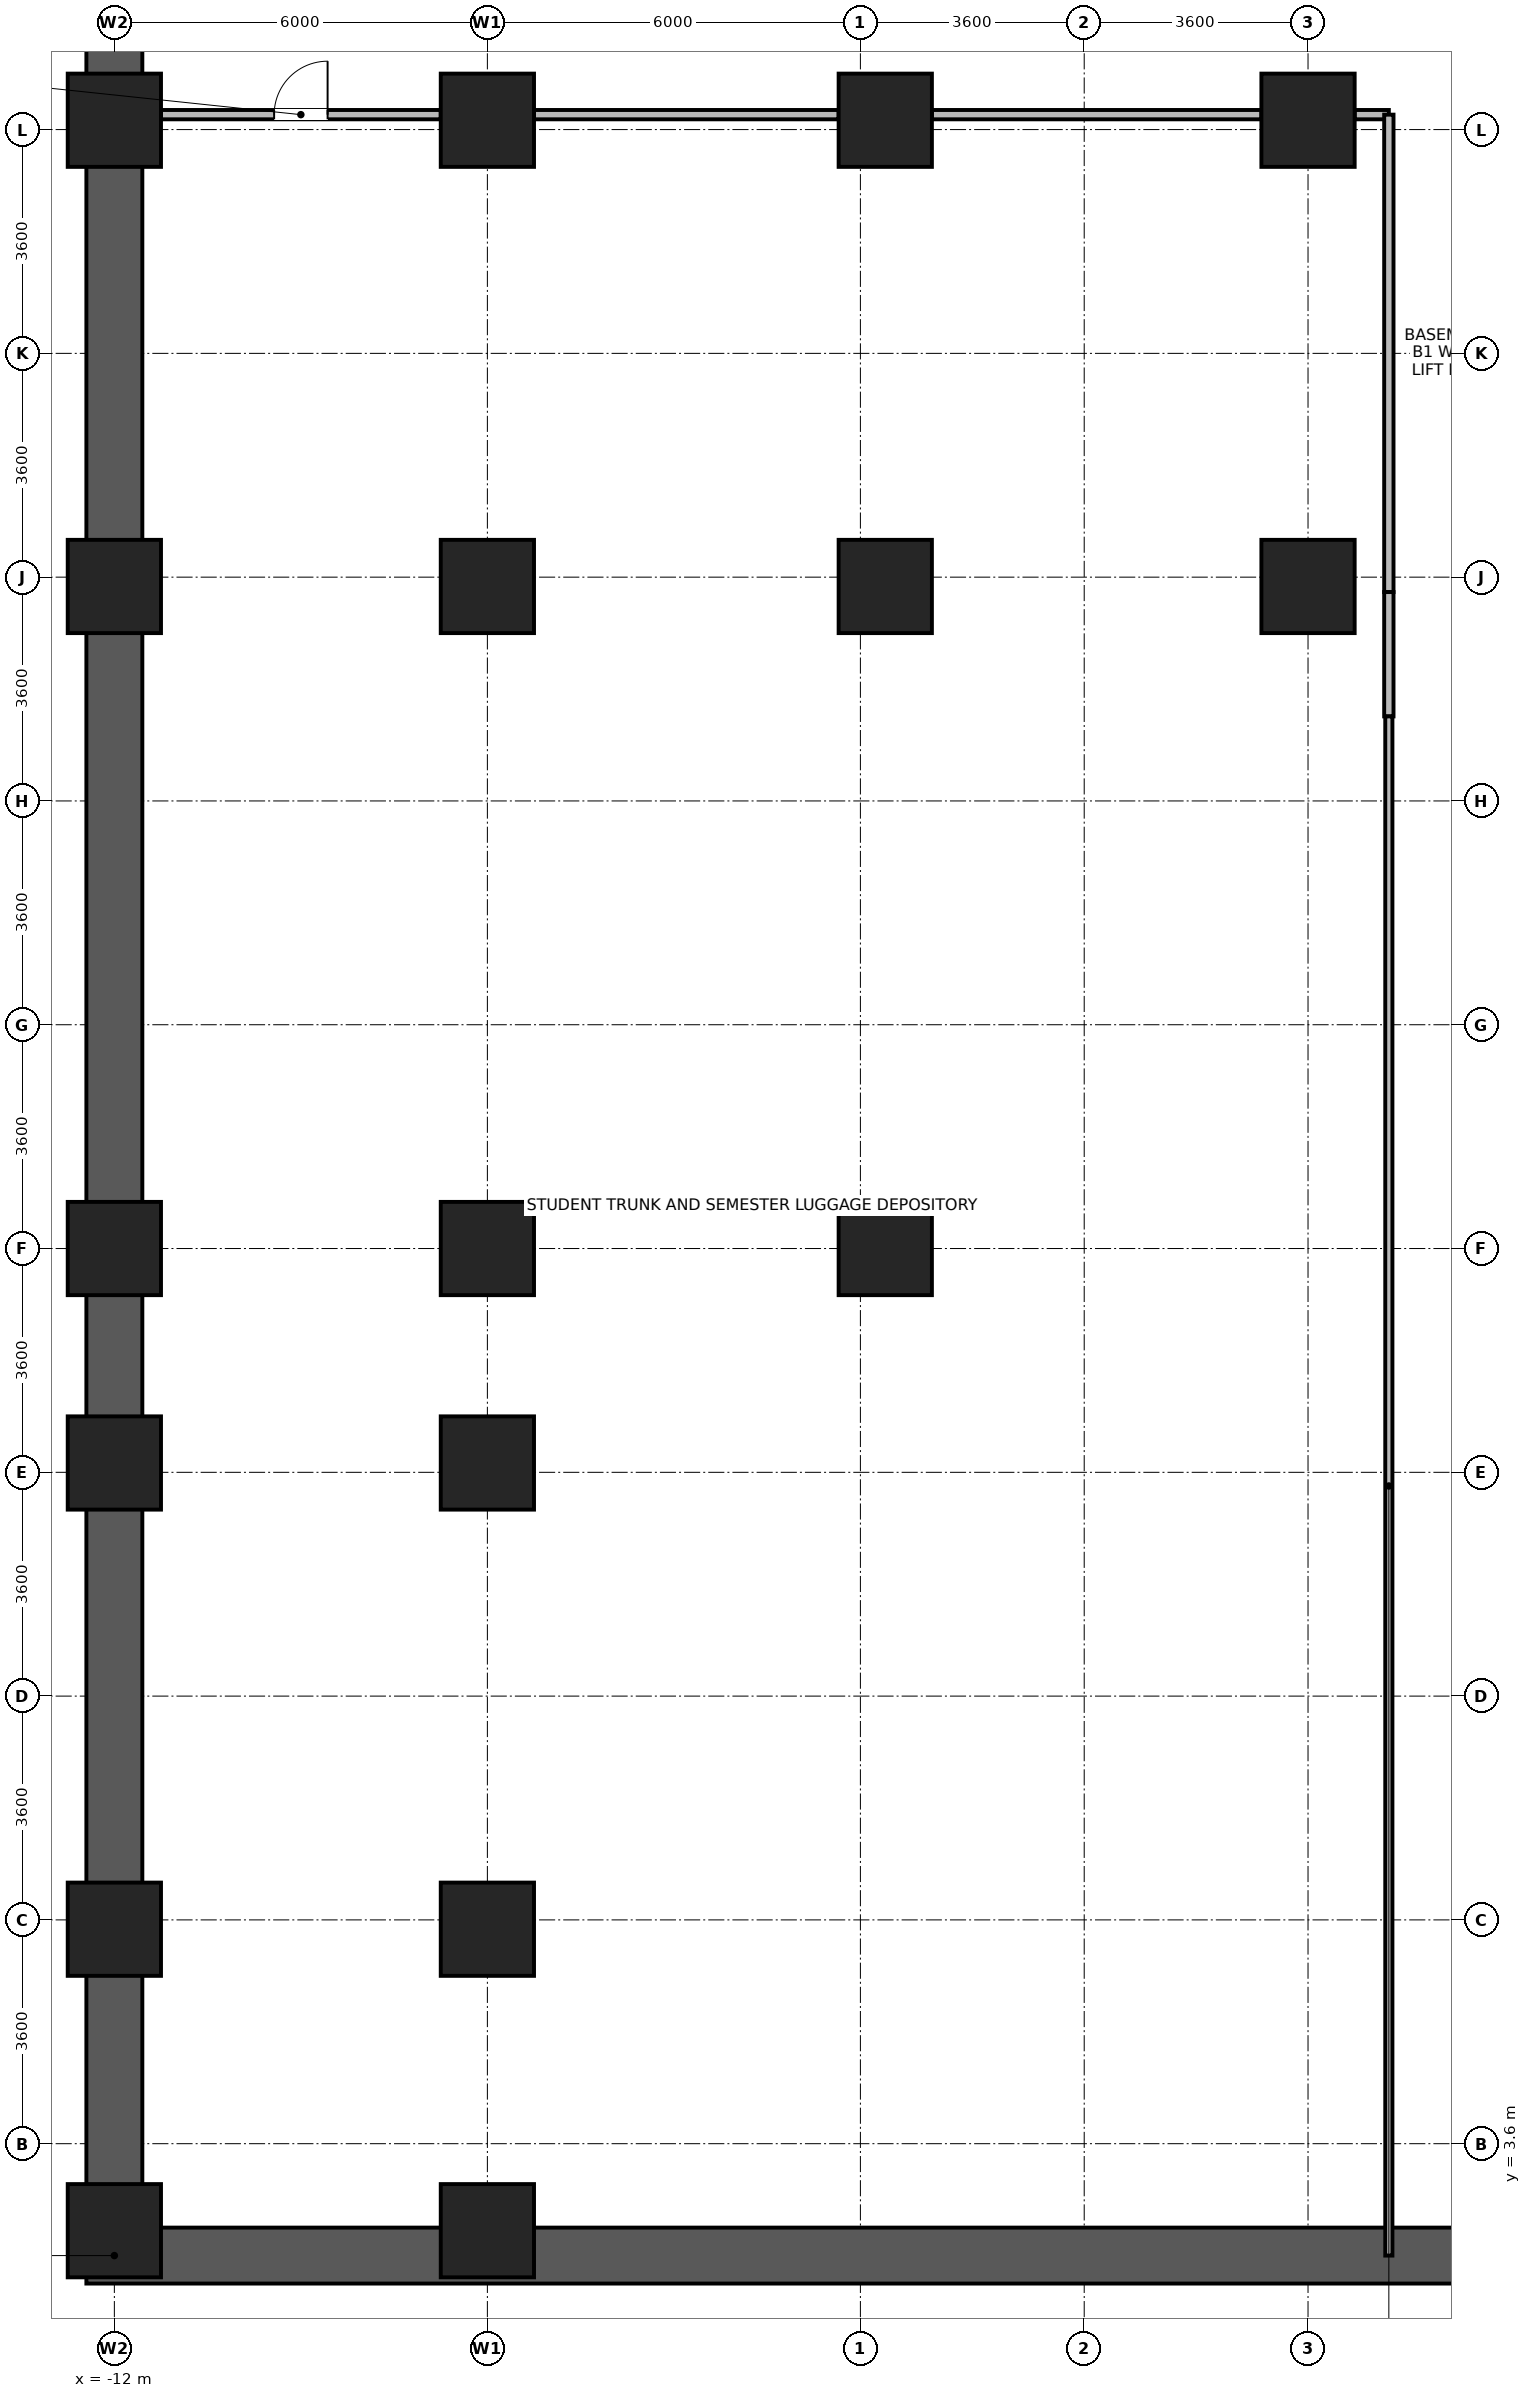
"""IFC4 building model, lengths in metres.
Left out: names, types, materials, properties, quantities, classifications, styles, units other than length and angle.
Written with IfcOpenShell. Run it as: python <this file> out.ifc"""

import sys

from ifc_helpers import new_model, si_unit, direction, frame, frame_2d, origin, origin_2d, place, context, subcontext, project, spatial, rectangle, extrude, source, transform, mapped, element, fill, save


model = new_model("IFC4")
c1 = context("Model", 3, precision=1e-05, world=origin(), true_north=direction((0.0, 1.0)))
c2 = subcontext(c1, "Body", "Model", "MODEL_VIEW")
j1 = project(units=[si_unit("LENGTHUNIT", "METRE"), si_unit("PLANEANGLEUNIT", "RADIAN")], contexts=[c1])
p1 = place(None, origin())
s1 = spatial("IfcSite", under=j1, at=p1, CompositionType="ELEMENT")
p2 = place(p1, origin())
s2 = spatial("IfcBuilding", under=s1, at=p2, CompositionType="ELEMENT")
p3 = place(p2, frame((0.0, 0.0, -4.5)))
s3 = spatial("IfcBuildingStorey", under=s2, at=p3, CompositionType="ELEMENT", Elevation=-4.5)
p4 = place(p3, frame((-12.45, 1.8, 0.0), z_axis=(0.0, 0.0, 1.0), x_axis=(1.0, 0.0, 0.0)))
e1 = element("IfcWall", 1, at=p4, inside=s3, PredefinedType="USERDEFINED", context=c2, shape_type="SweptSolid", body=[
    extrude(rectangle(XDim=86.1, YDim=0.9, at=frame_2d((43.05, 0.0))), origin(), (0.0, 0.0, 1.0), 4.15),
])
p5 = place(p3, frame((-12.0, 2.25, 0.0), z_axis=(0.0, 0.0, 1.0), x_axis=(0.0, 1.0, 0.0)))
e2 = element("IfcWall", 2, at=p5, inside=s3, PredefinedType="USERDEFINED", context=c2, shape_type="SweptSolid", body=[
    extrude(rectangle(XDim=42.15, YDim=0.9, at=frame_2d((21.075, 0.0))), origin(), (0.0, 0.0, 1.0), 4.15),
])
m1 = source(origin(), c2, "Body", "SweptSolid", [
    extrude(rectangle(XDim=1.5, YDim=1.5, at=origin_2d()), origin(), (0.0, 0.0, 1.0), 4.5),
])
for number, where, z_axis, x_axis in (
    (3, (7.2, 28.65, 0.0), (0.0, 0.0, 1.0), (1.0, 0.0, 0.0)),
    (4, (7.2, 36.15, 0.0), (0.0, 0.0, 1.0), (1.0, 0.0, 0.0)),
    (5, (0.4, 18.0, 0.0), (0.0, 0.0, 1.0), (1.0, 0.0, 0.0)),
    (6, (0.4, 28.65, 0.0), (0.0, 0.0, 1.0), (1.0, 0.0, 0.0)),
    (7, (0.4, 36.15, 0.0), (0.0, 0.0, 1.0), (1.0, 0.0, 0.0)),
    (8, (-12.0, 18.0, 0.0), (0.0, 0.0, 1.0), (1.0, 0.0, 0.0)),
    (9, (-12.0, 28.65, 0.0), (0.0, 0.0, 1.0), (1.0, 0.0, 0.0)),
    (10, (-12.0, 36.15, 0.0), (0.0, 0.0, 1.0), (1.0, 0.0, 0.0)),
    (11, (-6.0, 18.0, 0.0), (0.0, 0.0, 1.0), (1.0, 0.0, 0.0)),
    (12, (-6.0, 28.65, 0.0), (0.0, 0.0, 1.0), (1.0, 0.0, 0.0)),
    (13, (-6.0, 36.15, 0.0), (0.0, 0.0, 1.0), (1.0, 0.0, 0.0)),
    (14, (-12.0, 2.2, 0.0), (0.0, 0.0, 1.0), (1.0, 0.0, 0.0)),
    (15, (-6.0, 2.2, 0.0), (0.0, 0.0, 1.0), (1.0, 0.0, 0.0)),
    (16, (-12.0, 7.05, 0.0), (0.0, 0.0, 1.0), (1.0, 0.0, 0.0)),
    (17, (-6.0, 7.05, 0.0), (0.0, 0.0, 1.0), (1.0, 0.0, 0.0)),
    (18, (-12.0, 14.55, 0.0), (0.0, 0.0, 1.0), (1.0, 0.0, 0.0)),
    (19, (-6.0, 14.55, 0.0), (0.0, 0.0, 1.0), (1.0, 0.0, 0.0)),
):
    element("IfcColumn", number, at=place(p3, frame(where, z_axis=z_axis, x_axis=x_axis)), inside=s3, PredefinedType="COLUMN", context=c2, shape_type="MappedRepresentation", body=[
        mapped(m1, transform((0.0, 0.0, 0.0), x_axis=(1.0, 0.0, 0.0), y_axis=(0.0, 1.0, 0.0), z_axis=(0.0, 0.0, 1.0), scale=1.0)),
    ])
p6 = place(p3, frame((-11.25, 36.24, 0.0), z_axis=(0.0, 0.0, 1.0), x_axis=(1.0, 0.0, 0.0)))
e20 = element("IfcWall", 20, at=p6, inside=s3, PredefinedType="PARTITIONING", context=c2, shape_type="SweptSolid", body=[
    extrude(rectangle(XDim=4.5, YDim=0.15, at=frame_2d((2.25, 0.0))), origin(), (0.0, 0.0, 1.0), 3.43),
])
p7 = place(p6, frame((1.82, 0.0, 0.0)))
e21 = element("IfcOpeningElement", 21, at=p7, cuts=e20, PredefinedType="OPENING", context=c2, shape_type="SweptSolid", body=[
    extrude(rectangle(XDim=0.86, YDim=2.02, at=frame_2d((0.43, 1.01))), frame((0.0, 0.085, 0.0), z_axis=(0.0, -1.0, 0.0), x_axis=(1.0, 0.0, 0.0)), (0.0, 0.0, 1.0), 0.17),
])
p8 = place(p3, frame((-5.25, 36.24, 0.0), z_axis=(0.0, 0.0, 1.0), x_axis=(1.0, 0.0, 0.0)))
e22 = element("IfcWall", 22, at=p8, inside=s3, PredefinedType="PARTITIONING", context=c2, shape_type="SweptSolid", body=[
    extrude(rectangle(XDim=4.9, YDim=0.15, at=frame_2d((2.45, 0.0))), origin(), (0.0, 0.0, 1.0), 3.43),
])
p9 = place(p3, frame((1.15, 36.24, 0.0), z_axis=(0.0, 0.0, 1.0), x_axis=(1.0, 0.0, 0.0)))
e23 = element("IfcWall", 23, at=p9, inside=s3, PredefinedType="PARTITIONING", context=c2, shape_type="SweptSolid", body=[
    extrude(rectangle(XDim=5.3, YDim=0.15, at=frame_2d((2.65, 0.0))), origin(), (0.0, 0.0, 1.0), 3.43),
])
p10 = place(p3, frame((7.95, 36.24, 0.0), z_axis=(0.0, 0.0, 1.0), x_axis=(1.0, 0.0, 0.0)))
e24 = element("IfcWall", 24, at=p10, inside=s3, PredefinedType="PARTITIONING", context=c2, shape_type="SweptSolid", body=[
    extrude(rectangle(XDim=0.55, YDim=0.15, at=frame_2d((0.275, 0.0))), origin(), (0.0, 0.0, 1.0), 3.43),
])
p11 = place(p3, frame((8.5, 28.56, 0.0), z_axis=(0.0, 0.0, 1.0), x_axis=(0.0, 1.0, 0.0)))
e25 = element("IfcWall", 25, at=p11, inside=s3, PredefinedType="PARTITIONING", context=c2, shape_type="SweptSolid", body=[
    extrude(rectangle(XDim=7.68, YDim=0.15, at=frame_2d((3.84, 0.0))), origin(), (0.0, 0.0, 1.0), 4.13),
])
p12 = place(p3, frame((8.5, 26.56, 0.0), z_axis=(0.0, 0.0, 1.0), x_axis=(0.0, 1.0, 0.0)))
e26 = element("IfcWall", 26, at=p12, inside=s3, PredefinedType="PARTITIONING", context=c2, shape_type="SweptSolid", body=[
    extrude(rectangle(XDim=2.0, YDim=0.15, at=frame_2d((1.0, 0.0))), origin(), (0.0, 0.0, 1.0), 4.13),
])
p13 = place(p3, frame((8.5, 1.8, 0.0), z_axis=(0.0, 0.0, 1.0), x_axis=(0.0, 1.0, 0.0)))
e27 = element("IfcWall", 27, at=p13, inside=s3, PredefinedType="PARTITIONING", context=c2, shape_type="SweptSolid", body=[
    extrude(rectangle(XDim=24.76, YDim=0.115, at=frame_2d((12.38, 0.0))), origin(), (0.0, 0.0, 1.0), 4.13),
])
p14 = place(p7, origin())
e28 = element("IfcDoor", 28, at=p14, inside=s3, OperationType="SINGLE_SWING_RIGHT", PredefinedType="DOOR", context=c2, shape_type="SweptSolid", body=[
    extrude(rectangle(XDim=0.86, YDim=2.02, at=frame_2d((0.43, 1.01))), frame((0.0, 0.025, 0.0), z_axis=(0.0, -1.0, 0.0), x_axis=(1.0, 0.0, 0.0)), (0.0, 0.0, 1.0), 0.05),
])
fill(e21, e28)
save(model, sys.argv[1])
